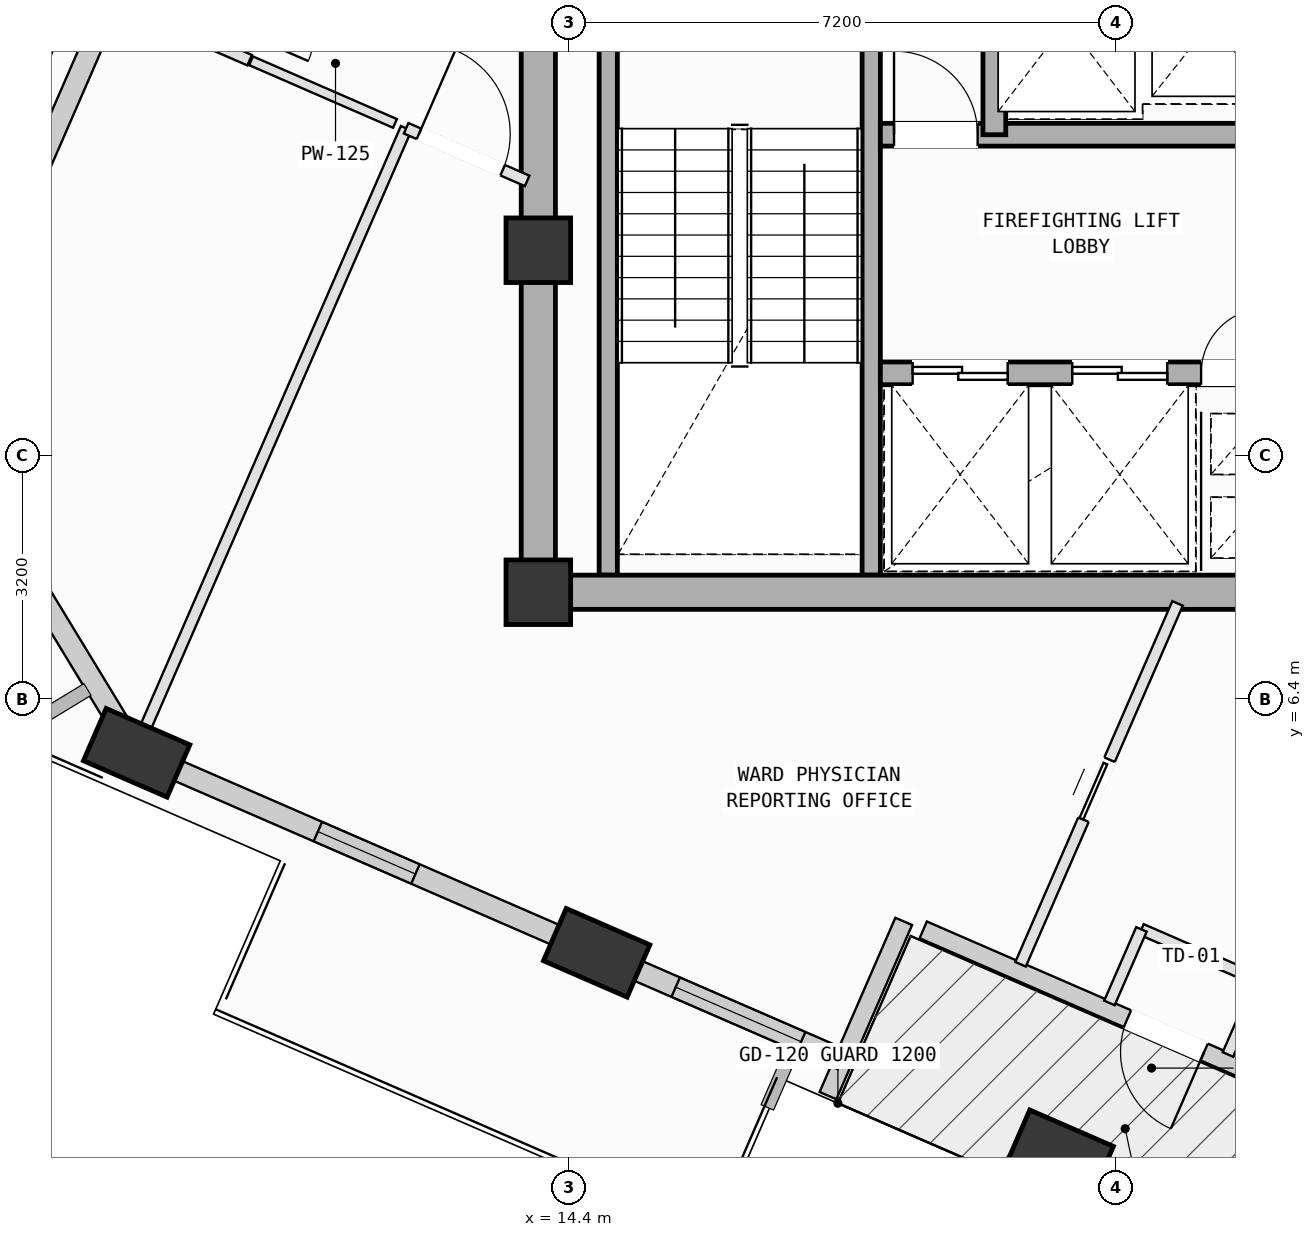
"""IFC4 building model, lengths in metres.
Left out: names, types, materials, properties, quantities, classifications, styles, units other than length and angle.
Written with IfcOpenShell. Run it as: python <this file> out.ifc"""

import sys

from ifc_helpers import new_model, si_unit, direction, frame, frame_2d, origin, origin_2d, place, context, subcontext, project, spatial, rectangle, extrude, element, fill, save


model = new_model("IFC4")
c1 = context("Model", 3, precision=1e-05, world=origin(), true_north=direction((0.0, 1.0)))
c2 = subcontext(c1, "Body", "Model", "MODEL_VIEW")
j1 = project(units=[si_unit("LENGTHUNIT", "METRE"), si_unit("PLANEANGLEUNIT", "RADIAN")], contexts=[c1])
p1 = place(None, origin())
s1 = spatial("IfcSite", under=j1, at=p1, CompositionType="ELEMENT")
p2 = place(p1, origin())
s2 = spatial("IfcBuilding", under=s1, at=p2, CompositionType="ELEMENT")
p3 = place(p2, frame((0.0, 0.0, 308.6)))
s3 = spatial("IfcBuildingStorey", under=s2, at=p3, CompositionType="ELEMENT", Elevation=308.6)
for number, where, z_axis, x_axis in (
    (1, (14.0, 7.8, 0.0), (0.0, 0.0, 1.0), (1.0, 0.0, 0.0)),
    (2, (14.0, 12.3, 0.0), (0.0, 0.0, 1.0), (1.0, 0.0, 0.0)),
):
    element("IfcColumn", number, at=place(p3, frame(where, z_axis=z_axis, x_axis=x_axis)), inside=s3, PredefinedType="COLUMN", context=c2, shape_type="SweptSolid", body=[
        extrude(rectangle(XDim=0.85, YDim=0.85, at=origin_2d()), origin(), (0.0, 0.0, 1.0), 4.0),
    ])
for number, where, z_axis, x_axis in (
    (3, (8.715, 5.688, 0.002), (0.0, 0.0, 1.0), (-0.917, 0.399, 0.0)),
    (4, (14.768, 3.056, 0.002), (0.0, 0.0, 1.0), (-0.917, 0.399, 0.0)),
    (5, (20.866, 0.404, 0.002), (0.0, 0.0, 1.0), (-0.917, 0.399, 0.0)),
):
    element("IfcColumn", number, at=place(p3, frame(where, z_axis=z_axis, x_axis=x_axis)), inside=s3, PredefinedType="COLUMN", context=c2, shape_type="SweptSolid", body=[
        extrude(rectangle(XDim=1.2, YDim=0.75, at=origin_2d()), origin(), (0.0, 0.0, 1.0), 3.996),
    ])
p4 = place(p3, frame((25.447, 0.583, 0.0), z_axis=(0.0, 0.0, 1.0), x_axis=(-0.917069498579, 0.398727394062, 0.0)))
e6 = element("IfcWall", 6, at=p4, inside=s3, PredefinedType="SOLIDWALL", context=c2, shape_type="SweptSolid", body=[
    extrude(rectangle(XDim=6.96, YDim=0.24, at=frame_2d((3.48, 0.0))), origin(), (0.0, 0.0, 1.0), 3.265),
])
p5 = place(p4, frame((2.93, 0.0, 0.0)))
e7 = element("IfcOpeningElement", 7, at=p5, cuts=e6, PredefinedType="OPENING", context=c2, shape_type="SweptSolid", body=[
    extrude(rectangle(XDim=1.1, YDim=2.15, at=frame_2d((0.55, 1.075))), frame((0.0, 0.13, 0.0), z_axis=(0.0, -1.0, 0.0), x_axis=(1.0, 0.0, 0.0)), (0.0, 0.0, 1.0), 0.26),
])
p6 = place(p3, frame((18.808, 3.469, 0.0), z_axis=(0.0, 0.0, 1.0), x_axis=(-0.398758251475, -0.917056081644, 0.0)))
e8 = element("IfcWall", 8, at=p6, inside=s3, PredefinedType="SOLIDWALL", context=c2, shape_type="SweptSolid", body=[
    extrude(rectangle(XDim=2.5, YDim=0.24, at=frame_2d((1.25, 0.0))), origin(), (0.0, 0.0, 1.0), 3.265),
])
p7 = place(p3, frame((6.172, 10.498, 0.0), z_axis=(0.0, 0.0, 1.0), x_axis=(0.398740578379, 0.917063766133, 0.0)))
e9 = element("IfcWall", 9, at=p7, inside=s3, PredefinedType="SOLIDWALL", context=c2, shape_type="SweptSolid", body=[
    extrude(rectangle(XDim=7.405, YDim=0.28, at=frame_2d((3.702, 0.0))), origin(), (0.0, 0.0, 1.0), 3.265),
])
p8 = place(p3, frame((8.509, 6.027, 0.0), z_axis=(0.0, 0.0, 1.0), x_axis=(-0.51924554751, 0.854625099907, 0.0)))
e10 = element("IfcWall", 10, at=p8, inside=s3, PredefinedType="SOLIDWALL", context=c2, shape_type="SweptSolid", body=[
    extrude(rectangle(XDim=4.407, YDim=0.28, at=frame_2d((2.204, 0.0))), origin(), (0.0, 0.0, 1.0), 3.265),
])
p9 = place(p3, frame((14.403, 3.215, 0.0), z_axis=(0.0, 0.0, 1.0), x_axis=(-0.917061363729, 0.398746103624, 0.0)))
e11 = element("IfcWall", 11, at=p9, inside=s3, PredefinedType="SOLIDWALL", context=c2, shape_type="SweptSolid", body=[
    extrude(rectangle(XDim=5.805, YDim=0.28, at=frame_2d((2.902, 0.0))), origin(), (0.0, 0.0, 1.0), 3.245),
])
p10 = place(p9, frame((2.202, 0.0, 0.75)))
e12 = element("IfcOpeningElement", 12, at=p10, cuts=e11, PredefinedType="OPENING", context=c2, shape_type="SweptSolid", body=[
    extrude(rectangle(XDim=1.4, YDim=1.85, at=frame_2d((0.7, 0.925))), frame((0.0, 0.15, 0.0), z_axis=(0.0, -1.0, 0.0), x_axis=(1.0, 0.0, 0.0)), (0.0, 0.0, 1.0), 0.3),
])
p11 = place(p3, frame((17.996, 1.652, 0.0), z_axis=(0.0, 0.0, 1.0), x_axis=(-0.917057625411, 0.398754701133, 0.0)))
e13 = element("IfcWall", 13, at=p11, inside=s3, PredefinedType="SOLIDWALL", context=c2, shape_type="SweptSolid", body=[
    extrude(rectangle(XDim=3.123, YDim=0.28, at=frame_2d((1.561, 0.0))), origin(), (0.0, 0.0, 1.0), 3.245),
])
p12 = place(p11, frame((0.586, 0.0, 0.75)))
e14 = element("IfcOpeningElement", 14, at=p12, cuts=e13, PredefinedType="OPENING", context=c2, shape_type="SweptSolid", body=[
    extrude(rectangle(XDim=1.8, YDim=2.05, at=frame_2d((0.9, 1.025))), frame((0.0, 0.15, 0.0), z_axis=(0.0, -1.0, 0.0), x_axis=(1.0, 0.0, 0.0)), (0.0, 0.0, 1.0), 0.3),
])
for number, where, z_axis, x_axis in (
    (15, (18.38, 15.12, 0.0), (0.0, 0.0, 1.0), (0.0, -1.0, 0.0)),
    (16, (14.92, 8.025, 0.0), (0.0, 0.0, 1.0), (0.0, 1.0, 0.0)),
):
    element("IfcWall", number, at=place(p3, frame(where, z_axis=z_axis, x_axis=x_axis)), inside=s3, PredefinedType="SOLIDWALL", context=c2, shape_type="SweptSolid", body=[
        extrude(rectangle(XDim=7.095, YDim=0.24, at=frame_2d((3.548, 0.0))), origin(), (0.0, 0.0, 1.0), 3.78),
    ])
p13 = place(p3, frame((14.0, 7.8, 0.0), z_axis=(0.0, 0.0, 1.0), x_axis=(1.0, 0.0, 0.0)))
e17 = element("IfcWall", 17, at=p13, inside=s3, PredefinedType="SHEAR", context=c2, shape_type="SweptSolid", body=[
    extrude(rectangle(XDim=10.8, YDim=0.45, at=frame_2d((5.4, 0.0))), origin(), (0.0, 0.0, 1.0), 3.78),
])
p14 = place(p3, frame((14.0, 16.8, 0.0), z_axis=(0.0, 0.0, 1.0), x_axis=(0.0, -1.0, 0.0)))
e18 = element("IfcWall", 18, at=p14, inside=s3, PredefinedType="SHEAR", context=c2, shape_type="SweptSolid", body=[
    extrude(rectangle(XDim=9.0, YDim=0.45, at=frame_2d((4.5, 0.0))), origin(), (0.0, 0.0, 1.0), 3.78),
])
p15 = place(p3, frame((18.5, 10.68, 0.0), z_axis=(0.0, 0.0, 1.0), x_axis=(1.0, 0.0, 0.0)))
e19 = element("IfcWall", 19, at=p15, inside=s3, PredefinedType="SOLIDWALL", context=c2, shape_type="SweptSolid", body=[
    extrude(rectangle(XDim=5.3, YDim=0.3, at=frame_2d((2.65, 0.0))), origin(), (0.0, 0.0, 1.0), 3.78),
])
p16 = place(p15, frame((4.22, 0.0, 0.0)))
e20 = element("IfcOpeningElement", 20, at=p16, cuts=e19, PredefinedType="OPENING", context=c2, shape_type="SweptSolid", body=[
    extrude(rectangle(XDim=0.86, YDim=2.06, at=frame_2d((0.43, 1.03))), frame((0.0, 0.16, 0.0), z_axis=(0.0, -1.0, 0.0), x_axis=(1.0, 0.0, 0.0)), (0.0, 0.0, 1.0), 0.32),
])
p17 = place(p15, frame((0.425, 0.0, 0.0)))
e21 = element("IfcOpeningElement", 21, at=p17, cuts=e19, PredefinedType="OPENING", context=c2, shape_type="SweptSolid", body=[
    extrude(rectangle(XDim=1.25, YDim=2.18, at=frame_2d((0.625, 1.09))), frame((0.0, 0.16, 0.0), z_axis=(0.0, -1.0, 0.0), x_axis=(1.0, 0.0, 0.0)), (0.0, 0.0, 1.0), 0.32),
])
p18 = place(p15, frame((2.525, 0.0, 0.0)))
e22 = element("IfcOpeningElement", 22, at=p18, cuts=e19, PredefinedType="OPENING", context=c2, shape_type="SweptSolid", body=[
    extrude(rectangle(XDim=1.25, YDim=2.18, at=frame_2d((0.625, 1.09))), frame((0.0, 0.16, 0.0), z_axis=(0.0, -1.0, 0.0), x_axis=(1.0, 0.0, 0.0)), (0.0, 0.0, 1.0), 0.32),
])
p19 = place(p3, frame((18.5, 13.82, 0.0), z_axis=(0.0, 0.0, 1.0), x_axis=(1.0, 0.0, 0.0)))
e23 = element("IfcWall", 23, at=p19, inside=s3, PredefinedType="SOLIDWALL", context=c2, shape_type="SweptSolid", body=[
    extrude(rectangle(XDim=5.3, YDim=0.3, at=frame_2d((2.65, 0.0))), origin(), (0.0, 0.0, 1.0), 3.78),
])
p20 = place(p19, frame((0.18, 0.0, 0.0)))
e24 = element("IfcOpeningElement", 24, at=p20, cuts=e23, PredefinedType="OPENING", context=c2, shape_type="SweptSolid", body=[
    extrude(rectangle(XDim=1.1, YDim=2.15, at=frame_2d((0.55, 1.075))), frame((0.0, 0.16, 0.0), z_axis=(0.0, -1.0, 0.0), x_axis=(1.0, 0.0, 0.0)), (0.0, 0.0, 1.0), 0.32),
])
p21 = place(p3, frame((20.0, 13.82, 0.0), z_axis=(0.0, 0.0, 1.0), x_axis=(0.0, 1.0, 0.0)))
e25 = element("IfcWall", 25, at=p21, inside=s3, PredefinedType="SOLIDWALL", context=c2, shape_type="SweptSolid", body=[
    extrude(rectangle(XDim=2.73, YDim=0.3, at=frame_2d((1.365, 0.0))), origin(), (0.0, 0.0, 1.0), 3.78),
])
p22 = place(p3, frame((23.073, 1.718, 0.0), z_axis=(0.0, 0.0, 1.0), x_axis=(0.398743025997, 0.917062701901, 0.0)))
e26 = element("IfcWall", 26, at=p22, inside=s3, PredefinedType="PARTITIONING", context=c2, shape_type="SweptSolid", body=[
    extrude(rectangle(XDim=1.056, YDim=0.15, at=frame_2d((0.528, 0.0))), origin(), (0.0, 0.0, 1.0), 3.78),
])
p23 = place(p3, frame((23.494, 2.686, 0.0), z_axis=(0.0, 0.0, 1.0), x_axis=(-0.917022099739, 0.398836393262, 0.0)))
e27 = element("IfcWall", 27, at=p23, inside=s3, PredefinedType="PARTITIONING", context=c2, shape_type="SweptSolid", body=[
    extrude(rectangle(XDim=1.7, YDim=0.15, at=frame_2d((0.85, 0.0))), origin(), (0.0, 0.0, 1.0), 3.78),
])
p24 = place(p3, frame((21.935, 3.364, 0.0), z_axis=(0.0, 0.0, 1.0), x_axis=(-0.398937514446, -0.916978112916, 0.0)))
e28 = element("IfcWall", 28, at=p24, inside=s3, PredefinedType="PARTITIONING", context=c2, shape_type="SweptSolid", body=[
    extrude(rectangle(XDim=1.056, YDim=0.15, at=frame_2d((0.528, 0.0))), origin(), (0.0, 0.0, 1.0), 2.745),
])
p25 = place(p3, frame((20.345, 2.905, 0.0), z_axis=(0.0, 0.0, 1.0), x_axis=(0.398819215719, 0.917029570501, 0.0)))
e29 = element("IfcWall", 29, at=p25, inside=s3, PredefinedType="PARTITIONING", context=c2, shape_type="SweptSolid", body=[
    extrude(rectangle(XDim=5.178, YDim=0.15, at=frame_2d((2.589, 0.0))), origin(), (0.0, 0.0, 1.0), 3.78),
])
p26 = place(p25, frame((2.075, 0.0, 0.0)))
e30 = element("IfcOpeningElement", 30, at=p26, cuts=e29, PredefinedType="OPENING", context=c2, shape_type="SweptSolid", body=[
    extrude(rectangle(XDim=0.86, YDim=2.06, at=frame_2d((0.43, 1.03))), frame((0.0, 0.085, 0.0), z_axis=(0.0, -1.0, 0.0), x_axis=(1.0, 0.0, 0.0)), (0.0, 0.0, 1.0), 0.17),
])
p27 = place(p3, frame((15.041, 2.687, 0.0), z_axis=(0.0, 0.0, 1.0), x_axis=(-0.917294270683, 0.398210021186, 0.0)))
e31 = element("IfcWall", 31, at=p27, inside=s3, PredefinedType="PARTITIONING", context=c2, shape_type="SweptSolid", body=[
    extrude(rectangle(XDim=0.796, YDim=0.15, at=frame_2d((0.398, 0.0))), origin(), (0.0, 0.0, 1.0), 3.245),
])
p28 = place(p3, frame((8.988, 5.318, 0.0), z_axis=(0.0, 0.0, 1.0), x_axis=(-0.916831392251, 0.399274589954, 0.0)))
e32 = element("IfcWall", 32, at=p28, inside=s3, PredefinedType="PARTITIONING", context=c2, shape_type="SweptSolid", body=[
    extrude(rectangle(XDim=0.423, YDim=0.15, at=frame_2d((0.211, 0.0))), origin(), (0.0, 0.0, 1.0), 3.265),
])
p29 = place(p3, frame((8.6, 5.487, 0.0), z_axis=(0.0, 0.0, 1.0), x_axis=(0.398808773401, 0.917034111829, 0.0)))
e33 = element("IfcWall", 33, at=p29, inside=s3, PredefinedType="PARTITIONING", context=c2, shape_type="SweptSolid", body=[
    extrude(rectangle(XDim=9.179, YDim=0.15, at=frame_2d((4.59, 0.0))), origin(), (0.0, 0.0, 1.0), 3.78),
])
p30 = place(p3, frame((12.261, 13.905, 0.0), z_axis=(0.0, 0.0, 1.0), x_axis=(0.91708123515, -0.398700398965, 0.0)))
e34 = element("IfcWall", 34, at=p30, inside=s3, PredefinedType="PARTITIONING", context=c2, shape_type="SweptSolid", body=[
    extrude(rectangle(XDim=1.736, YDim=0.15, at=frame_2d((0.868, 0.0))), origin(), (0.0, 0.0, 1.0), 3.78),
])
p31 = place(p30, frame((0.184, 0.0, 0.0)))
e35 = element("IfcOpeningElement", 35, at=p31, cuts=e34, PredefinedType="OPENING", context=c2, shape_type="SweptSolid", body=[
    extrude(rectangle(XDim=1.2, YDim=2.15, at=frame_2d((0.6, 1.075))), frame((0.0, 0.085, 0.0), z_axis=(0.0, -1.0, 0.0), x_axis=(1.0, 0.0, 0.0)), (0.0, 0.0, 1.0), 0.17),
])
p32 = place(p3, frame((8.492, 15.544, 0.0), z_axis=(0.0, 0.0, 1.0), x_axis=(0.917176199692, -0.398481892585, 0.0)))
e36 = element("IfcWall", 36, at=p32, inside=s3, PredefinedType="PARTITIONING", context=c2, shape_type="SweptSolid", body=[
    extrude(rectangle(XDim=1.864, YDim=0.15, at=frame_2d((0.932, 0.0))), origin(), (0.0, 0.0, 1.0), 3.78),
])
p33 = place(p3, frame((10.22, 14.793, 0.0), z_axis=(0.0, 0.0, 1.0), x_axis=(0.916985473765, -0.398920594735, 0.0)))
e37 = element("IfcWall", 37, at=p33, inside=s3, PredefinedType="PARTITIONING", context=c2, shape_type="SweptSolid", body=[
    extrude(rectangle(XDim=2.065, YDim=0.125, at=frame_2d((1.033, 0.0))), origin(), (0.0, 0.0, 1.0), 3.78),
])
p34 = place(p3, frame((5.828, 11.01, 0.0), z_axis=(0.0, 0.0, 1.0), x_axis=(0.398767783479, 0.917051936838, 0.0)))
e38 = element("IfcWall", 38, at=p34, inside=s3, PredefinedType="PARTITIONING", context=c2, shape_type="SweptSolid", body=[
    extrude(rectangle(XDim=6.641, YDim=0.15, at=frame_2d((3.32, 0.0))), origin(), (0.0, 0.0, 1.0), 3.78),
])
p35 = place(p5, origin())
e39 = element("IfcDoor", 39, at=p35, inside=s3, OperationType="SINGLE_SWING_LEFT", PredefinedType="DOOR", context=c2, shape_type="SweptSolid", body=[
    extrude(rectangle(XDim=1.1, YDim=2.15, at=frame_2d((0.55, 1.075))), frame((0.0, 0.025, 0.0), z_axis=(0.0, -1.0, 0.0), x_axis=(1.0, 0.0, 0.0)), (0.0, 0.0, 1.0), 0.05),
])
fill(e7, e39)
p36 = place(p10, origin())
e40 = element("IfcWindow", 40, at=p36, inside=s3, PartitioningType="SINGLE_PANEL", PredefinedType="WINDOW", context=c2, shape_type="SweptSolid", body=[
    extrude(rectangle(XDim=1.4, YDim=1.85, at=frame_2d((0.7, 0.925))), frame((0.0, 0.03, 0.0), z_axis=(0.0, -1.0, 0.0), x_axis=(1.0, 0.0, 0.0)), (0.0, 0.0, 1.0), 0.06),
])
fill(e12, e40)
p37 = place(p12, origin())
e41 = element("IfcWindow", 41, at=p37, inside=s3, PartitioningType="SINGLE_PANEL", PredefinedType="WINDOW", context=c2, shape_type="SweptSolid", body=[
    extrude(rectangle(XDim=1.8, YDim=2.05, at=frame_2d((0.9, 1.025))), frame((0.0, 0.03, 0.0), z_axis=(0.0, -1.0, 0.0), x_axis=(1.0, 0.0, 0.0)), (0.0, 0.0, 1.0), 0.06),
])
fill(e14, e41)
p38 = place(p16, origin())
e42 = element("IfcDoor", 42, at=p38, inside=s3, OperationType="SINGLE_SWING_RIGHT", PredefinedType="DOOR", context=c2, shape_type="SweptSolid", body=[
    extrude(rectangle(XDim=0.86, YDim=2.06, at=frame_2d((0.43, 1.03))), frame((0.0, 0.025, 0.0), z_axis=(0.0, -1.0, 0.0), x_axis=(1.0, 0.0, 0.0)), (0.0, 0.0, 1.0), 0.05),
])
fill(e20, e42)
p39 = place(p20, origin())
e43 = element("IfcDoor", 43, at=p39, inside=s3, OperationType="SINGLE_SWING_LEFT", PredefinedType="DOOR", context=c2, shape_type="SweptSolid", body=[
    extrude(rectangle(XDim=1.1, YDim=2.15, at=frame_2d((0.55, 1.075))), frame((0.0, 0.025, 0.0), z_axis=(0.0, -1.0, 0.0), x_axis=(1.0, 0.0, 0.0)), (0.0, 0.0, 1.0), 0.05),
])
fill(e24, e43)
p40 = place(p17, origin())
e44 = element("IfcDoor", 44, at=p40, inside=s3, OperationType="DOUBLE_DOOR_SLIDING", PredefinedType="DOOR", context=c2, shape_type="SweptSolid", body=[
    extrude(rectangle(XDim=1.25, YDim=2.18, at=frame_2d((0.625, 1.09))), frame((0.0, 0.025, 0.0), z_axis=(0.0, -1.0, 0.0), x_axis=(1.0, 0.0, 0.0)), (0.0, 0.0, 1.0), 0.05),
])
fill(e21, e44)
p41 = place(p18, origin())
e45 = element("IfcDoor", 45, at=p41, inside=s3, OperationType="DOUBLE_DOOR_SLIDING", PredefinedType="DOOR", context=c2, shape_type="SweptSolid", body=[
    extrude(rectangle(XDim=1.25, YDim=2.18, at=frame_2d((0.625, 1.09))), frame((0.0, 0.025, 0.0), z_axis=(0.0, -1.0, 0.0), x_axis=(1.0, 0.0, 0.0)), (0.0, 0.0, 1.0), 0.05),
])
fill(e22, e45)
p42 = place(p31, origin())
e46 = element("IfcDoor", 46, at=p42, inside=s3, OperationType="SINGLE_SWING_LEFT", PredefinedType="DOOR", context=c2, shape_type="SweptSolid", body=[
    extrude(rectangle(XDim=1.2, YDim=2.15, at=frame_2d((0.6, 1.075))), frame((0.0, 0.025, 0.0), z_axis=(0.0, -1.0, 0.0), x_axis=(1.0, 0.0, 0.0)), (0.0, 0.0, 1.0), 0.05),
])
fill(e35, e46)
p43 = place(p26, origin())
e47 = element("IfcDoor", 47, at=p43, inside=s3, OperationType="SLIDING_TO_LEFT", PredefinedType="DOOR", context=c2, shape_type="SweptSolid", body=[
    extrude(rectangle(XDim=0.86, YDim=2.06, at=frame_2d((0.43, 1.03))), frame((0.0, 0.025, 0.0), z_axis=(0.0, -1.0, 0.0), x_axis=(1.0, 0.0, 0.0)), (0.0, 0.0, 1.0), 0.05),
])
fill(e30, e47)
save(model, sys.argv[1])
